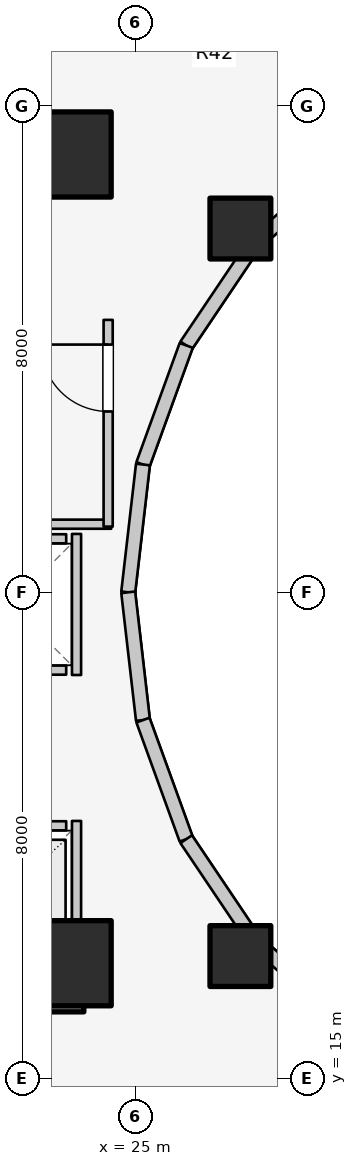
"""IFC4 building model, lengths in metres.
Left out: names, types, materials, properties, quantities, classifications, styles, units other than length and angle.
Written with IfcOpenShell. Run it as: python <this file> out.ifc"""

import sys

from ifc_helpers import new_model, si_unit, direction, frame, frame_2d, origin, origin_2d, place, context, subcontext, project, spatial, rectangle, extrude, element, fill, save


model = new_model("IFC4")
c1 = context("Model", 3, precision=1e-05, world=origin(), true_north=direction((0.0, 1.0)))
c2 = subcontext(c1, "Body", "Model", "MODEL_VIEW")
j1 = project(units=[si_unit("LENGTHUNIT", "METRE"), si_unit("PLANEANGLEUNIT", "RADIAN")], contexts=[c1])
p1 = place(None, origin())
s1 = spatial("IfcSite", under=j1, at=p1, CompositionType="ELEMENT")
p2 = place(p1, origin())
s2 = spatial("IfcBuilding", under=s1, at=p2, CompositionType="ELEMENT")
p3 = place(p2, frame((0.0, 0.0, 33.8)))
s3 = spatial("IfcBuildingStorey", under=s2, at=p3, CompositionType="ELEMENT", Elevation=33.8)
for number, where, z_axis, x_axis in (
    (1, (19.65, 16.55, 0.0), (0.0, 0.0, 1.0), (1.0, 0.0, 0.0)),
    (2, (19.65, 30.35, 0.0), (0.0, 0.0, 1.0), (1.0, 0.0, 0.0)),
):
    element("IfcWall", number, at=place(p3, frame(where, z_axis=z_axis, x_axis=x_axis)), inside=s3, PredefinedType="SHEAR", context=c2, shape_type="SweptSolid", body=[
        extrude(rectangle(XDim=4.5, YDim=0.9, at=frame_2d((2.25, 0.0))), origin(), (0.0, 0.0, 1.0), 3.1),
    ])
for number, where, z_axis, x_axis in (
    (3, (23.9, 16.9, 0.0), (0.0, 0.0, 1.0), (1.0, 0.0, 0.0)),
    (4, (23.9, 30.2, 0.0), (0.0, 0.0, 1.0), (1.0, 0.0, 0.0)),
):
    element("IfcColumn", number, at=place(p3, frame(where, z_axis=z_axis, x_axis=x_axis)), inside=s3, PredefinedType="COLUMN", context=c2, shape_type="SweptSolid", body=[
        extrude(rectangle(XDim=1.4, YDim=1.4, at=origin_2d()), origin(), (0.0, 0.0, 1.0), 3.1),
    ])
for number, where, z_axis, x_axis in (
    (5, (26.725, 28.982, 0.0), (0.0, 0.0, 1.0), (1.0, 0.0, 0.0)),
    (6, (26.725, 17.018, 0.0), (0.0, 0.0, 1.0), (1.0, 0.0, 0.0)),
):
    element("IfcColumn", number, at=place(p3, frame(where, z_axis=z_axis, x_axis=x_axis)), inside=s3, PredefinedType="COLUMN", context=c2, shape_type="SweptSolid", body=[
        extrude(rectangle(XDim=1.0, YDim=1.0, at=origin_2d()), origin(), (0.0, 0.0, 1.0), 3.1),
    ])
p4 = place(p3, frame((28.44, 30.032, 0.0), z_axis=(0.0, 0.0, 1.0), x_axis=(-0.752576694707, -0.658504607869, 0.0)))
e7 = element("IfcWall", 7, at=p4, inside=s3, PredefinedType="STANDARD", context=c2, shape_type="SweptSolid", body=[
    extrude(rectangle(XDim=1.959, YDim=0.23, at=frame_2d((0.98, 0.0))), origin(), (0.0, 0.0, 1.0), 1.22),
])
p5 = place(p3, frame((26.965, 28.742, 0.0), z_axis=(0.0, 0.0, 1.0), x_axis=(-0.558197800898, -0.829707909492, 0.0)))
e8 = element("IfcWall", 8, at=p5, inside=s3, PredefinedType="STANDARD", context=c2, shape_type="SweptSolid", body=[
    extrude(rectangle(XDim=2.027, YDim=0.23, at=frame_2d((1.013, 0.0))), origin(), (0.0, 0.0, 1.0), 1.22),
])
p6 = place(p3, frame((25.834, 27.06, 0.0), z_axis=(0.0, 0.0, 1.0), x_axis=(-0.341423187295, -0.93990968033, 0.0)))
e9 = element("IfcWall", 9, at=p6, inside=s3, PredefinedType="STANDARD", context=c2, shape_type="SweptSolid", body=[
    extrude(rectangle(XDim=2.084, YDim=0.23, at=frame_2d((1.042, 0.0))), origin(), (0.0, 0.0, 1.0), 2.56),
])
for number, where, z_axis, x_axis in (
    (10, (25.123, 25.102, 0.0), (0.0, 0.0, 1.0), (-0.115, -0.993, 0.0)),
    (11, (24.88, 23.0, 0.0), (0.0, 0.0, 1.0), (0.115, -0.993, 0.0)),
):
    element("IfcWall", number, at=place(p3, frame(where, z_axis=z_axis, x_axis=x_axis)), inside=s3, PredefinedType="STANDARD", context=c2, shape_type="SweptSolid", body=[
        extrude(rectangle(XDim=2.115, YDim=0.23, at=frame_2d((1.058, 0.0))), origin(), (0.0, 0.0, 1.0), 2.56),
    ])
p7 = place(p3, frame((25.123, 20.898, 0.0), z_axis=(0.0, 0.0, 1.0), x_axis=(0.341423187295, -0.93990968033, 0.0)))
e12 = element("IfcWall", 12, at=p7, inside=s3, PredefinedType="STANDARD", context=c2, shape_type="SweptSolid", body=[
    extrude(rectangle(XDim=2.084, YDim=0.23, at=frame_2d((1.042, 0.0))), origin(), (0.0, 0.0, 1.0), 2.56),
])
p8 = place(p3, frame((25.834, 18.94, 0.0), z_axis=(0.0, 0.0, 1.0), x_axis=(0.558197800898, -0.829707909492, 0.0)))
e13 = element("IfcWall", 13, at=p8, inside=s3, PredefinedType="STANDARD", context=c2, shape_type="SweptSolid", body=[
    extrude(rectangle(XDim=2.027, YDim=0.23, at=frame_2d((1.013, 0.0))), origin(), (0.0, 0.0, 1.0), 1.22),
])
p9 = place(p3, frame((26.965, 17.258, 0.0), z_axis=(0.0, 0.0, 1.0), x_axis=(0.752576694707, -0.658504607869, 0.0)))
e14 = element("IfcWall", 14, at=p9, inside=s3, PredefinedType="STANDARD", context=c2, shape_type="SweptSolid", body=[
    extrude(rectangle(XDim=1.959, YDim=0.23, at=frame_2d((0.98, 0.0))), origin(), (0.0, 0.0, 1.0), 1.22),
])
p10 = place(p3, frame((22.04, 19.16, 0.0), z_axis=(0.0, 0.0, 1.0), x_axis=(1.0, 0.0, 0.0)))
e15 = element("IfcWall", 15, at=p10, inside=s3, PredefinedType="SOLIDWALL", context=c2, shape_type="SweptSolid", body=[
    extrude(rectangle(XDim=1.82, YDim=0.15, at=frame_2d((0.91, 0.0))), origin(), (0.0, 0.0, 1.0), 2.12),
])
p11 = place(p10, frame((0.36, 0.0, 0.0)))
e16 = element("IfcOpeningElement", 16, at=p11, cuts=e15, PredefinedType="OPENING", context=c2, shape_type="SweptSolid", body=[
    extrude(rectangle(XDim=1.1, YDim=2.1, at=frame_2d((0.55, 1.05))), frame((0.0, 0.085, 0.0), z_axis=(0.0, -1.0, 0.0), x_axis=(1.0, 0.0, 0.0)), (0.0, 0.0, 1.0), 0.17),
])
p12 = place(p3, frame((22.04, 17.1, 0.0), z_axis=(0.0, 0.0, 1.0), x_axis=(1.0, 0.0, 0.0)))
e17 = element("IfcWall", 17, at=p12, inside=s3, PredefinedType="SOLIDWALL", context=c2, shape_type="SweptSolid", body=[
    extrude(rectangle(XDim=1.82, YDim=0.15, at=frame_2d((0.91, 0.0))), origin(), (0.0, 0.0, 1.0), 2.12),
])
p13 = place(p3, frame((24.03, 17.02, 0.0), z_axis=(0.0, 0.0, 1.0), x_axis=(0.0, 1.0, 0.0)))
e18 = element("IfcWall", 18, at=p13, inside=s3, PredefinedType="SOLIDWALL", context=c2, shape_type="SweptSolid", body=[
    extrude(rectangle(XDim=2.22, YDim=0.15, at=frame_2d((1.11, 0.0))), origin(), (0.0, 0.0, 1.0), 1.873),
])
for number, where, z_axis, x_axis in (
    (19, (22.04, 21.72, 0.0), (0.0, 0.0, 1.0), (1.0, 0.0, 0.0)),
    (20, (22.04, 23.88, 0.0), (0.0, 0.0, 1.0), (1.0, 0.0, 0.0)),
):
    element("IfcWall", number, at=place(p3, frame(where, z_axis=z_axis, x_axis=x_axis)), inside=s3, PredefinedType="SOLIDWALL", context=c2, shape_type="SweptSolid", body=[
        extrude(rectangle(XDim=1.82, YDim=0.15, at=frame_2d((0.91, 0.0))), origin(), (0.0, 0.0, 1.0), 2.12),
    ])
p14 = place(p3, frame((24.03, 21.64, 0.0), z_axis=(0.0, 0.0, 1.0), x_axis=(0.0, 1.0, 0.0)))
e21 = element("IfcWall", 21, at=p14, inside=s3, PredefinedType="SOLIDWALL", context=c2, shape_type="SweptSolid", body=[
    extrude(rectangle(XDim=2.32, YDim=0.15, at=frame_2d((1.16, 0.0))), origin(), (0.0, 0.0, 1.0), 2.12),
])
p15 = place(p3, frame((19.52, 24.12, 0.0), z_axis=(0.0, 0.0, 1.0), x_axis=(1.0, 0.0, 0.0)))
e22 = element("IfcWall", 22, at=p15, inside=s3, PredefinedType="PARTITIONING", context=c2, shape_type="SweptSolid", body=[
    extrude(rectangle(XDim=5.08, YDim=0.15, at=frame_2d((2.54, 0.0))), origin(), (0.0, 0.0, 1.0), 2.12),
])
p16 = place(p3, frame((24.55, 24.08, 0.0), z_axis=(0.0, 0.0, 1.0), x_axis=(0.0, 1.0, 0.0)))
e23 = element("IfcWall", 23, at=p16, inside=s3, PredefinedType="PARTITIONING", context=c2, shape_type="SweptSolid", body=[
    extrude(rectangle(XDim=3.4, YDim=0.15, at=frame_2d((1.7, 0.0))), origin(), (0.0, 0.0, 1.0), 2.575),
])
p17 = place(p16, frame((1.894, 0.0, 0.0)))
e24 = element("IfcOpeningElement", 24, at=p17, cuts=e23, PredefinedType="OPENING", context=c2, shape_type="SweptSolid", body=[
    extrude(rectangle(XDim=1.1, YDim=2.1, at=frame_2d((0.55, 1.05))), frame((0.0, 0.085, 0.0), z_axis=(0.0, -1.0, 0.0), x_axis=(1.0, 0.0, 0.0)), (0.0, 0.0, 1.0), 0.17),
])
p18 = place(p17, origin())
e25 = element("IfcDoor", 25, at=p18, inside=s3, OperationType="SINGLE_SWING_RIGHT", PredefinedType="DOOR", context=c2, shape_type="SweptSolid", body=[
    extrude(rectangle(XDim=1.1, YDim=2.1, at=frame_2d((0.55, 1.05))), frame((0.0, 0.025, 0.0), z_axis=(0.0, -1.0, 0.0), x_axis=(1.0, 0.0, 0.0)), (0.0, 0.0, 1.0), 0.05),
])
fill(e24, e25)
save(model, sys.argv[1])
